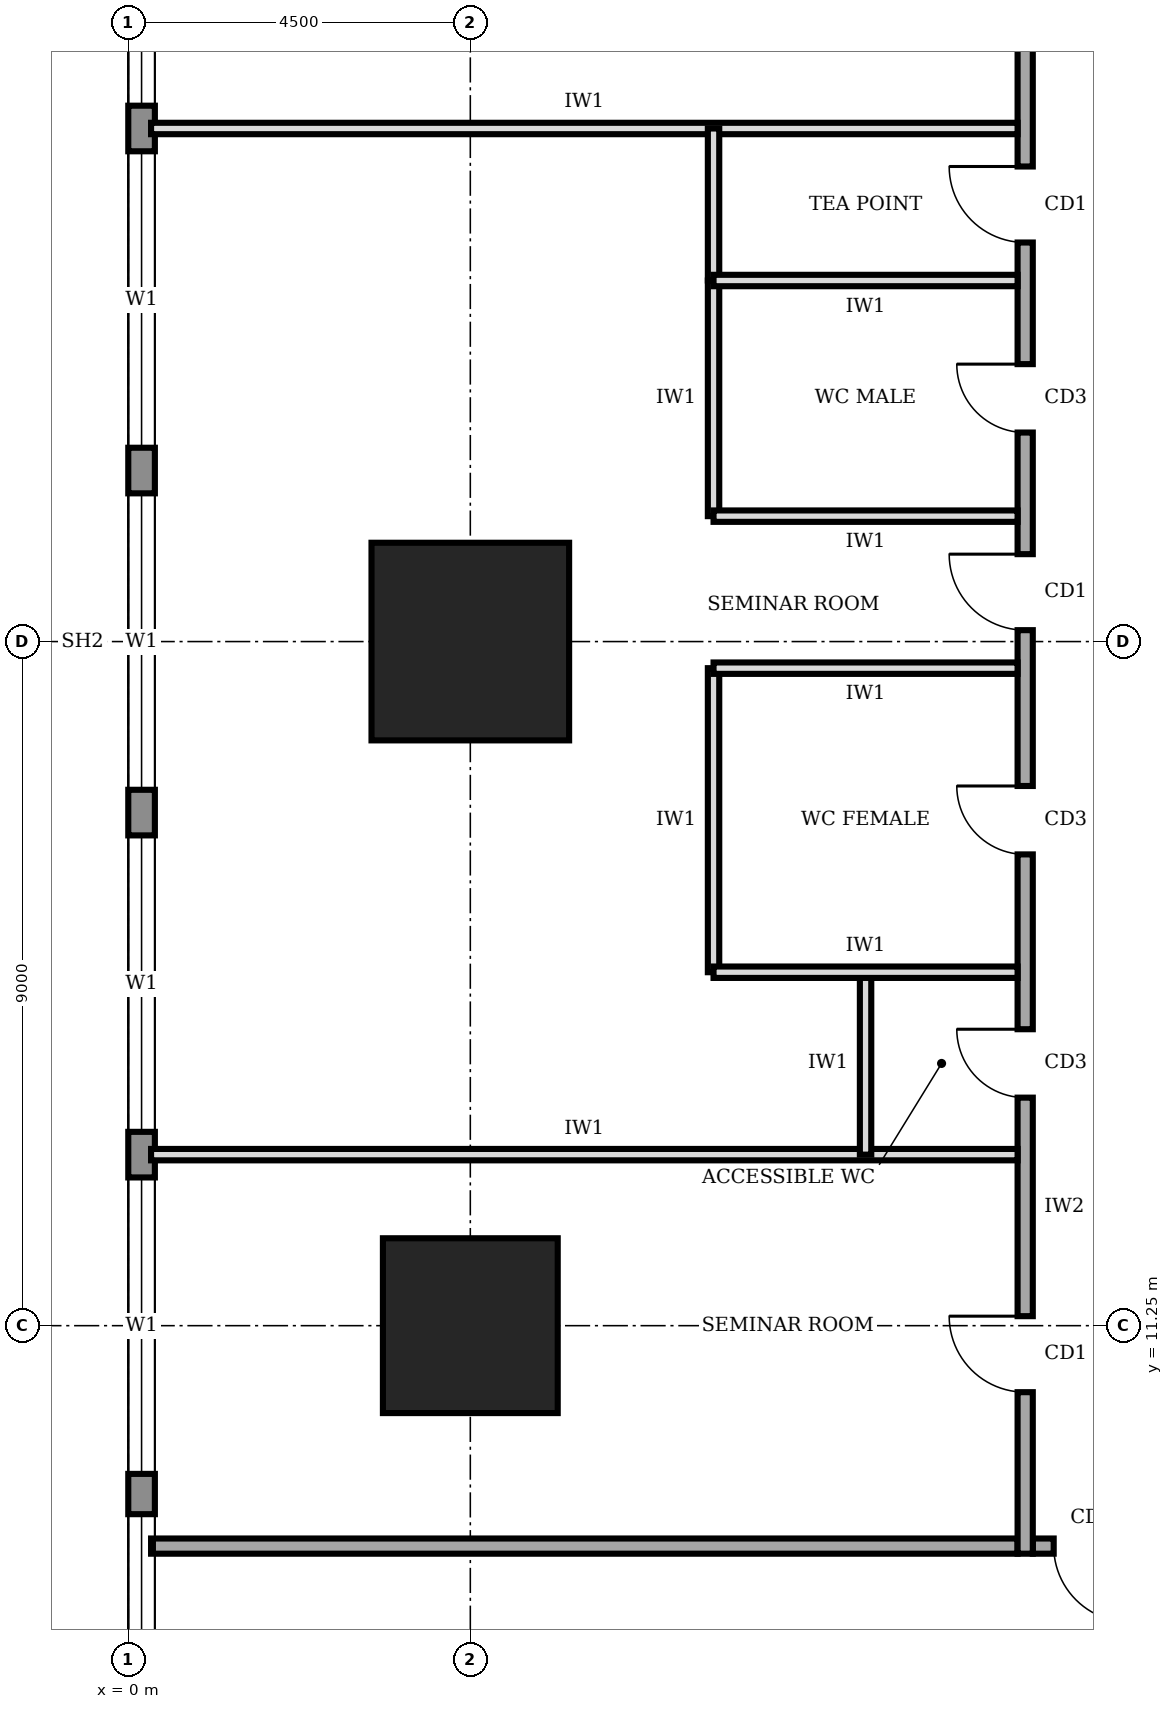
"""IFC4 building model, lengths in metres.
Left out: names, types, materials, properties, quantities, classifications, styles, units other than length and angle.
Written with IfcOpenShell. Run it as: python <this file> out.ifc"""

import sys

from ifc_helpers import new_model, si_unit, direction, frame, frame_2d, origin, origin_2d, place, context, subcontext, project, spatial, rectangle, extrude, element, fill, save


model = new_model("IFC4")
c1 = context("Model", 3, precision=1e-05, world=origin(), true_north=direction((0.0, 1.0)))
c2 = subcontext(c1, "Body", "Model", "MODEL_VIEW")
j1 = project(units=[si_unit("LENGTHUNIT", "METRE"), si_unit("PLANEANGLEUNIT", "RADIAN")], contexts=[c1])
p1 = place(None, origin())
s1 = spatial("IfcSite", under=j1, at=p1, CompositionType="ELEMENT")
p2 = place(p1, origin())
s2 = spatial("IfcBuilding", under=s1, at=p2, CompositionType="ELEMENT")
p3 = place(p2, frame((0.0, 0.0, 109.0)))
s3 = spatial("IfcBuildingStorey", under=s2, at=p3, CompositionType="ELEMENT", Elevation=109.0)
p4 = place(p3, frame((4.5, 11.25, 0.0), z_axis=(0.0, 0.0, 1.0), x_axis=(1.0, 0.0, 0.0)))
e1 = element("IfcColumn", 1, at=p4, inside=s3, PredefinedType="COLUMN", context=c2, shape_type="SweptSolid", body=[
    extrude(rectangle(XDim=2.3, YDim=2.3, at=origin_2d()), origin(), (0.0, 0.0, 1.0), 4.0),
])
p5 = place(p3, frame((4.5, 20.25, 0.0), z_axis=(0.0, 0.0, 1.0), x_axis=(1.0, 0.0, 0.0)))
e2 = element("IfcColumn", 2, at=p5, inside=s3, PredefinedType="COLUMN", context=c2, shape_type="SweptSolid", body=[
    extrude(rectangle(XDim=2.6, YDim=2.6, at=origin_2d()), origin(), (0.0, 0.0, 1.0), 4.0),
])
p6 = place(p3, frame((0.175, 35.98, 0.0), z_axis=(0.0, 0.0, 1.0), x_axis=(0.0, -1.0, 0.0)))
e3 = element("IfcWall", 3, at=p6, inside=s3, PredefinedType="STANDARD", context=c2, shape_type="SweptSolid", body=[
    extrude(rectangle(XDim=31.46, YDim=0.35, at=frame_2d((15.73, 0.0))), origin(), (0.0, 0.0, 1.0), 3.75),
])
p7 = place(p6, frame((27.21, 0.0, 0.9)))
e4 = element("IfcOpeningElement", 4, at=p7, cuts=e3, PredefinedType="OPENING", context=c2, shape_type="SweptSolid", body=[
    extrude(rectangle(XDim=3.9, YDim=2.2, at=frame_2d((1.95, 1.1))), frame((0.0, 0.185, 0.0), z_axis=(0.0, -1.0, 0.0), x_axis=(1.0, 0.0, 0.0)), (0.0, 0.0, 1.0), 0.37),
])
p8 = place(p6, frame((22.78, 0.0, 0.9)))
e5 = element("IfcOpeningElement", 5, at=p8, cuts=e3, PredefinedType="OPENING", context=c2, shape_type="SweptSolid", body=[
    extrude(rectangle(XDim=3.9, YDim=2.2, at=frame_2d((1.95, 1.1))), frame((0.0, 0.185, 0.0), z_axis=(0.0, -1.0, 0.0), x_axis=(1.0, 0.0, 0.0)), (0.0, 0.0, 1.0), 0.37),
])
p9 = place(p6, frame((18.28, 0.0, 0.9)))
e6 = element("IfcOpeningElement", 6, at=p9, cuts=e3, PredefinedType="OPENING", context=c2, shape_type="SweptSolid", body=[
    extrude(rectangle(XDim=3.9, YDim=2.2, at=frame_2d((1.95, 1.1))), frame((0.0, 0.185, 0.0), z_axis=(0.0, -1.0, 0.0), x_axis=(1.0, 0.0, 0.0)), (0.0, 0.0, 1.0), 0.37),
])
p10 = place(p6, frame((13.78, 0.0, 0.9)))
e7 = element("IfcOpeningElement", 7, at=p10, cuts=e3, PredefinedType="OPENING", context=c2, shape_type="SweptSolid", body=[
    extrude(rectangle(XDim=3.9, YDim=2.2, at=frame_2d((1.95, 1.1))), frame((0.0, 0.185, 0.0), z_axis=(0.0, -1.0, 0.0), x_axis=(1.0, 0.0, 0.0)), (0.0, 0.0, 1.0), 0.37),
])
p11 = place(p6, frame((9.28, 0.0, 0.9)))
e8 = element("IfcOpeningElement", 8, at=p11, cuts=e3, PredefinedType="OPENING", context=c2, shape_type="SweptSolid", body=[
    extrude(rectangle(XDim=3.9, YDim=2.2, at=frame_2d((1.95, 1.1))), frame((0.0, 0.185, 0.0), z_axis=(0.0, -1.0, 0.0), x_axis=(1.0, 0.0, 0.0)), (0.0, 0.0, 1.0), 0.37),
])
p12 = place(p6, frame((4.78, 0.0, 0.9)))
e9 = element("IfcOpeningElement", 9, at=p12, cuts=e3, PredefinedType="OPENING", context=c2, shape_type="SweptSolid", body=[
    extrude(rectangle(XDim=3.9, YDim=2.2, at=frame_2d((1.95, 1.1))), frame((0.0, 0.185, 0.0), z_axis=(0.0, -1.0, 0.0), x_axis=(1.0, 0.0, 0.0)), (0.0, 0.0, 1.0), 0.37),
])
p13 = place(p3, frame((11.9, 8.35, 0.0), z_axis=(0.0, 0.0, 1.0), x_axis=(1.0, 0.0, 0.0)))
e10 = element("IfcWall", 10, at=p13, inside=s3, PredefinedType="SOLIDWALL", context=c2, shape_type="SweptSolid", body=[
    extrude(rectangle(XDim=16.9, YDim=0.2, at=frame_2d((8.45, 0.0))), origin(), (0.0, 0.0, 1.0), 3.75),
])
p14 = place(p13, frame((0.275, 0.0, 0.0)))
e11 = element("IfcOpeningElement", 11, at=p14, cuts=e10, PredefinedType="OPENING", context=c2, shape_type="SweptSolid", body=[
    extrude(rectangle(XDim=1.0, YDim=2.1, at=frame_2d((0.5, 1.05))), frame((0.0, 0.11, 0.0), z_axis=(0.0, -1.0, 0.0), x_axis=(1.0, 0.0, 0.0)), (0.0, 0.0, 1.0), 0.22),
])
p15 = place(p13, frame((5.6, 0.0, 0.0)))
e12 = element("IfcOpeningElement", 12, at=p15, cuts=e10, PredefinedType="OPENING", context=c2, shape_type="SweptSolid", body=[
    extrude(rectangle(XDim=1.0, YDim=2.1, at=frame_2d((0.5, 1.05))), frame((0.0, 0.11, 0.0), z_axis=(0.0, -1.0, 0.0), x_axis=(1.0, 0.0, 0.0)), (0.0, 0.0, 1.0), 0.22),
])
p16 = place(p13, frame((12.85, 0.0, 0.0)))
e13 = element("IfcOpeningElement", 13, at=p16, cuts=e10, PredefinedType="OPENING", context=c2, shape_type="SweptSolid", body=[
    extrude(rectangle(XDim=1.8, YDim=2.1, at=frame_2d((0.9, 1.05))), frame((0.0, 0.11, 0.0), z_axis=(0.0, -1.0, 0.0), x_axis=(1.0, 0.0, 0.0)), (0.0, 0.0, 1.0), 0.22),
])
p17 = place(p3, frame((11.8, 32.05, 0.0), z_axis=(0.0, 0.0, 1.0), x_axis=(0.0, -1.0, 0.0)))
e14 = element("IfcWall", 14, at=p17, inside=s3, PredefinedType="SOLIDWALL", context=c2, shape_type="SweptSolid", body=[
    extrude(rectangle(XDim=23.8, YDim=0.2, at=frame_2d((11.9, 0.0))), origin(), (0.0, 0.0, 1.0), 3.75),
])
p18 = place(p17, frame((20.675, 0.0, 0.0)))
e15 = element("IfcOpeningElement", 15, at=p18, cuts=e14, PredefinedType="OPENING", context=c2, shape_type="SweptSolid", body=[
    extrude(rectangle(XDim=1.0, YDim=2.1, at=frame_2d((0.5, 1.05))), frame((0.0, 0.11, 0.0), z_axis=(0.0, -1.0, 0.0), x_axis=(1.0, 0.0, 0.0)), (0.0, 0.0, 1.0), 0.22),
])
p19 = place(p17, frame((16.9, 0.0, 0.0)))
e16 = element("IfcOpeningElement", 16, at=p19, cuts=e14, PredefinedType="OPENING", context=c2, shape_type="SweptSolid", body=[
    extrude(rectangle(XDim=0.9, YDim=2.1, at=frame_2d((0.45, 1.05))), frame((0.0, 0.11, 0.0), z_axis=(0.0, -1.0, 0.0), x_axis=(1.0, 0.0, 0.0)), (0.0, 0.0, 1.0), 0.22),
])
p20 = place(p17, frame((13.7, 0.0, 0.0)))
e17 = element("IfcOpeningElement", 17, at=p20, cuts=e14, PredefinedType="OPENING", context=c2, shape_type="SweptSolid", body=[
    extrude(rectangle(XDim=0.9, YDim=2.1, at=frame_2d((0.45, 1.05))), frame((0.0, 0.11, 0.0), z_axis=(0.0, -1.0, 0.0), x_axis=(1.0, 0.0, 0.0)), (0.0, 0.0, 1.0), 0.22),
])
p21 = place(p17, frame((8.15, 0.0, 0.0)))
e18 = element("IfcOpeningElement", 18, at=p21, cuts=e14, PredefinedType="OPENING", context=c2, shape_type="SweptSolid", body=[
    extrude(rectangle(XDim=0.9, YDim=2.1, at=frame_2d((0.45, 1.05))), frame((0.0, 0.11, 0.0), z_axis=(0.0, -1.0, 0.0), x_axis=(1.0, 0.0, 0.0)), (0.0, 0.0, 1.0), 0.22),
])
p22 = place(p17, frame((5.55, 0.0, 0.0)))
e19 = element("IfcOpeningElement", 19, at=p22, cuts=e14, PredefinedType="OPENING", context=c2, shape_type="SweptSolid", body=[
    extrude(rectangle(XDim=1.0, YDim=2.1, at=frame_2d((0.5, 1.05))), frame((0.0, 0.11, 0.0), z_axis=(0.0, -1.0, 0.0), x_axis=(1.0, 0.0, 0.0)), (0.0, 0.0, 1.0), 0.22),
])
p23 = place(p17, frame((10.65, 0.0, 0.0)))
e20 = element("IfcOpeningElement", 20, at=p23, cuts=e14, PredefinedType="OPENING", context=c2, shape_type="SweptSolid", body=[
    extrude(rectangle(XDim=1.0, YDim=2.1, at=frame_2d((0.5, 1.05))), frame((0.0, 0.11, 0.0), z_axis=(0.0, -1.0, 0.0), x_axis=(1.0, 0.0, 0.0)), (0.0, 0.0, 1.0), 0.22),
])
p24 = place(p17, frame((1.925, 0.0, 0.0)))
e21 = element("IfcOpeningElement", 21, at=p24, cuts=e14, PredefinedType="OPENING", context=c2, shape_type="SweptSolid", body=[
    extrude(rectangle(XDim=1.0, YDim=2.1, at=frame_2d((0.5, 1.05))), frame((0.0, 0.11, 0.0), z_axis=(0.0, -1.0, 0.0), x_axis=(1.0, 0.0, 0.0)), (0.0, 0.0, 1.0), 0.22),
])
p25 = place(p3, frame((0.3, 8.35, 0.0), z_axis=(0.0, 0.0, 1.0), x_axis=(1.0, 0.0, 0.0)))
e22 = element("IfcWall", 22, at=p25, inside=s3, PredefinedType="SOLIDWALL", context=c2, shape_type="SweptSolid", body=[
    extrude(rectangle(XDim=11.4, YDim=0.2, at=frame_2d((5.7, 0.0))), origin(), (0.0, 0.0, 1.0), 3.75),
])
for number, where, z_axis, x_axis in (
    (23, (0.3, 13.5, 0.0), (0.0, 0.0, 1.0), (1.0, 0.0, 0.0)),
    (24, (0.3, 27.0, 0.0), (0.0, 0.0, 1.0), (1.0, 0.0, 0.0)),
):
    element("IfcWall", number, at=place(p3, frame(where, z_axis=z_axis, x_axis=x_axis)), inside=s3, PredefinedType="PARTITIONING", context=c2, shape_type="SweptSolid", body=[
        extrude(rectangle(XDim=11.4, YDim=0.15, at=frame_2d((5.7, 0.0))), origin(), (0.0, 0.0, 1.0), 3.75),
    ])
p26 = place(p3, frame((11.7, 15.9, 0.0), z_axis=(0.0, 0.0, 1.0), x_axis=(-1.0, 0.0, 0.0)))
e25 = element("IfcWall", 25, at=p26, inside=s3, PredefinedType="PARTITIONING", context=c2, shape_type="SweptSolid", body=[
    extrude(rectangle(XDim=4.0, YDim=0.15, at=frame_2d((2.0, 0.0))), origin(), (0.0, 0.0, 1.0), 3.75),
])
p27 = place(p3, frame((11.7, 19.9, 0.0), z_axis=(0.0, 0.0, 1.0), x_axis=(-1.0, 0.0, 0.0)))
e26 = element("IfcWall", 26, at=p27, inside=s3, PredefinedType="PARTITIONING", context=c2, shape_type="SweptSolid", body=[
    extrude(rectangle(XDim=4.0, YDim=0.15, at=frame_2d((2.0, 0.0))), origin(), (0.0, 0.0, 1.0), 2.85),
])
for number, where, z_axis, x_axis in (
    (27, (11.7, 21.9, 0.0), (0.0, 0.0, 1.0), (-1.0, 0.0, 0.0)),
    (28, (11.7, 25.0, 0.0), (0.0, 0.0, 1.0), (-1.0, 0.0, 0.0)),
):
    element("IfcWall", number, at=place(p3, frame(where, z_axis=z_axis, x_axis=x_axis)), inside=s3, PredefinedType="PARTITIONING", context=c2, shape_type="SweptSolid", body=[
        extrude(rectangle(XDim=4.0, YDim=0.15, at=frame_2d((2.0, 0.0))), origin(), (0.0, 0.0, 1.0), 3.75),
    ])
p28 = place(p3, frame((9.7, 13.5, 0.0), z_axis=(0.0, 0.0, 1.0), x_axis=(0.0, 1.0, 0.0)))
e29 = element("IfcWall", 29, at=p28, inside=s3, PredefinedType="PARTITIONING", context=c2, shape_type="SweptSolid", body=[
    extrude(rectangle(XDim=2.4, YDim=0.15, at=frame_2d((1.2, 0.0))), origin(), (0.0, 0.0, 1.0), 3.75),
])
p29 = place(p3, frame((7.7, 15.9, 0.0), z_axis=(0.0, 0.0, 1.0), x_axis=(0.0, 1.0, 0.0)))
e30 = element("IfcWall", 30, at=p29, inside=s3, PredefinedType="PARTITIONING", context=c2, shape_type="SweptSolid", body=[
    extrude(rectangle(XDim=4.0, YDim=0.15, at=frame_2d((2.0, 0.0))), origin(), (0.0, 0.0, 1.0), 3.75),
])
p30 = place(p3, frame((7.7, 21.9, 0.0), z_axis=(0.0, 0.0, 1.0), x_axis=(0.0, 1.0, 0.0)))
e31 = element("IfcWall", 31, at=p30, inside=s3, PredefinedType="PARTITIONING", context=c2, shape_type="SweptSolid", body=[
    extrude(rectangle(XDim=3.1, YDim=0.15, at=frame_2d((1.55, 0.0))), origin(), (0.0, 0.0, 1.0), 3.75),
])
p31 = place(p3, frame((7.7, 25.0, 0.0), z_axis=(0.0, 0.0, 1.0), x_axis=(0.0, 1.0, 0.0)))
e32 = element("IfcWall", 32, at=p31, inside=s3, PredefinedType="PARTITIONING", context=c2, shape_type="SweptSolid", body=[
    extrude(rectangle(XDim=2.0, YDim=0.15, at=frame_2d((1.0, 0.0))), origin(), (0.0, 0.0, 1.0), 3.75),
])
p32 = place(p7, origin())
e33 = element("IfcWindow", 33, at=p32, inside=s3, PartitioningType="SINGLE_PANEL", PredefinedType="WINDOW", context=c2, shape_type="SweptSolid", body=[
    extrude(rectangle(XDim=3.9, YDim=2.2, at=frame_2d((1.95, 1.1))), frame((0.0, 0.03, 0.0), z_axis=(0.0, -1.0, 0.0), x_axis=(1.0, 0.0, 0.0)), (0.0, 0.0, 1.0), 0.06),
])
fill(e4, e33)
p33 = place(p8, origin())
e34 = element("IfcWindow", 34, at=p33, inside=s3, PartitioningType="SINGLE_PANEL", PredefinedType="WINDOW", context=c2, shape_type="SweptSolid", body=[
    extrude(rectangle(XDim=3.9, YDim=2.2, at=frame_2d((1.95, 1.1))), frame((0.0, 0.03, 0.0), z_axis=(0.0, -1.0, 0.0), x_axis=(1.0, 0.0, 0.0)), (0.0, 0.0, 1.0), 0.06),
])
fill(e5, e34)
p34 = place(p9, origin())
e35 = element("IfcWindow", 35, at=p34, inside=s3, PartitioningType="SINGLE_PANEL", PredefinedType="WINDOW", context=c2, shape_type="SweptSolid", body=[
    extrude(rectangle(XDim=3.9, YDim=2.2, at=frame_2d((1.95, 1.1))), frame((0.0, 0.03, 0.0), z_axis=(0.0, -1.0, 0.0), x_axis=(1.0, 0.0, 0.0)), (0.0, 0.0, 1.0), 0.06),
])
fill(e6, e35)
p35 = place(p10, origin())
e36 = element("IfcWindow", 36, at=p35, inside=s3, PartitioningType="SINGLE_PANEL", PredefinedType="WINDOW", context=c2, shape_type="SweptSolid", body=[
    extrude(rectangle(XDim=3.9, YDim=2.2, at=frame_2d((1.95, 1.1))), frame((0.0, 0.03, 0.0), z_axis=(0.0, -1.0, 0.0), x_axis=(1.0, 0.0, 0.0)), (0.0, 0.0, 1.0), 0.06),
])
fill(e7, e36)
p36 = place(p11, origin())
e37 = element("IfcWindow", 37, at=p36, inside=s3, PartitioningType="SINGLE_PANEL", PredefinedType="WINDOW", context=c2, shape_type="SweptSolid", body=[
    extrude(rectangle(XDim=3.9, YDim=2.2, at=frame_2d((1.95, 1.1))), frame((0.0, 0.03, 0.0), z_axis=(0.0, -1.0, 0.0), x_axis=(1.0, 0.0, 0.0)), (0.0, 0.0, 1.0), 0.06),
])
fill(e8, e37)
p37 = place(p12, origin())
e38 = element("IfcWindow", 38, at=p37, inside=s3, PartitioningType="SINGLE_PANEL", PredefinedType="WINDOW", context=c2, shape_type="SweptSolid", body=[
    extrude(rectangle(XDim=3.9, YDim=2.2, at=frame_2d((1.95, 1.1))), frame((0.0, 0.03, 0.0), z_axis=(0.0, -1.0, 0.0), x_axis=(1.0, 0.0, 0.0)), (0.0, 0.0, 1.0), 0.06),
])
fill(e9, e38)
p38 = place(p14, frame((1.0, 0.0, 0.0), z_axis=(0.0, 0.0, 1.0), x_axis=(-1.0, 0.0, 0.0)))
e39 = element("IfcDoor", 39, at=p38, inside=s3, OperationType="SINGLE_SWING_LEFT", PredefinedType="DOOR", context=c2, shape_type="SweptSolid", body=[
    extrude(rectangle(XDim=1.0, YDim=2.1, at=frame_2d((0.5, 1.05))), frame((0.0, 0.025, 0.0), z_axis=(0.0, -1.0, 0.0), x_axis=(1.0, 0.0, 0.0)), (0.0, 0.0, 1.0), 0.05),
])
fill(e11, e39)
p39 = place(p18, frame((1.0, 0.0, 0.0), z_axis=(0.0, 0.0, 1.0), x_axis=(-1.0, 0.0, 0.0)))
e40 = element("IfcDoor", 40, at=p39, inside=s3, OperationType="SINGLE_SWING_RIGHT", PredefinedType="DOOR", context=c2, shape_type="SweptSolid", body=[
    extrude(rectangle(XDim=1.0, YDim=2.1, at=frame_2d((0.5, 1.05))), frame((0.0, 0.025, 0.0), z_axis=(0.0, -1.0, 0.0), x_axis=(1.0, 0.0, 0.0)), (0.0, 0.0, 1.0), 0.05),
])
fill(e15, e40)
p40 = place(p19, frame((0.9, 0.0, 0.0), z_axis=(0.0, 0.0, 1.0), x_axis=(-1.0, 0.0, 0.0)))
e41 = element("IfcDoor", 41, at=p40, inside=s3, OperationType="SINGLE_SWING_RIGHT", PredefinedType="DOOR", context=c2, shape_type="SweptSolid", body=[
    extrude(rectangle(XDim=0.9, YDim=2.1, at=frame_2d((0.45, 1.05))), frame((0.0, 0.025, 0.0), z_axis=(0.0, -1.0, 0.0), x_axis=(1.0, 0.0, 0.0)), (0.0, 0.0, 1.0), 0.05),
])
fill(e16, e41)
p41 = place(p20, frame((0.9, 0.0, 0.0), z_axis=(0.0, 0.0, 1.0), x_axis=(-1.0, 0.0, 0.0)))
e42 = element("IfcDoor", 42, at=p41, inside=s3, OperationType="SINGLE_SWING_RIGHT", PredefinedType="DOOR", context=c2, shape_type="SweptSolid", body=[
    extrude(rectangle(XDim=0.9, YDim=2.1, at=frame_2d((0.45, 1.05))), frame((0.0, 0.025, 0.0), z_axis=(0.0, -1.0, 0.0), x_axis=(1.0, 0.0, 0.0)), (0.0, 0.0, 1.0), 0.05),
])
fill(e17, e42)
p42 = place(p21, frame((0.9, 0.0, 0.0), z_axis=(0.0, 0.0, 1.0), x_axis=(-1.0, 0.0, 0.0)))
e43 = element("IfcDoor", 43, at=p42, inside=s3, OperationType="SINGLE_SWING_RIGHT", PredefinedType="DOOR", context=c2, shape_type="SweptSolid", body=[
    extrude(rectangle(XDim=0.9, YDim=2.1, at=frame_2d((0.45, 1.05))), frame((0.0, 0.025, 0.0), z_axis=(0.0, -1.0, 0.0), x_axis=(1.0, 0.0, 0.0)), (0.0, 0.0, 1.0), 0.05),
])
fill(e18, e43)
p43 = place(p22, frame((1.0, 0.0, 0.0), z_axis=(0.0, 0.0, 1.0), x_axis=(-1.0, 0.0, 0.0)))
e44 = element("IfcDoor", 44, at=p43, inside=s3, OperationType="SINGLE_SWING_RIGHT", PredefinedType="DOOR", context=c2, shape_type="SweptSolid", body=[
    extrude(rectangle(XDim=1.0, YDim=2.1, at=frame_2d((0.5, 1.05))), frame((0.0, 0.025, 0.0), z_axis=(0.0, -1.0, 0.0), x_axis=(1.0, 0.0, 0.0)), (0.0, 0.0, 1.0), 0.05),
])
fill(e19, e44)
p44 = place(p23, frame((1.0, 0.0, 0.0), z_axis=(0.0, 0.0, 1.0), x_axis=(-1.0, 0.0, 0.0)))
e45 = element("IfcDoor", 45, at=p44, inside=s3, OperationType="SINGLE_SWING_RIGHT", PredefinedType="DOOR", context=c2, shape_type="SweptSolid", body=[
    extrude(rectangle(XDim=1.0, YDim=2.1, at=frame_2d((0.5, 1.05))), frame((0.0, 0.025, 0.0), z_axis=(0.0, -1.0, 0.0), x_axis=(1.0, 0.0, 0.0)), (0.0, 0.0, 1.0), 0.05),
])
fill(e20, e45)
save(model, sys.argv[1])
